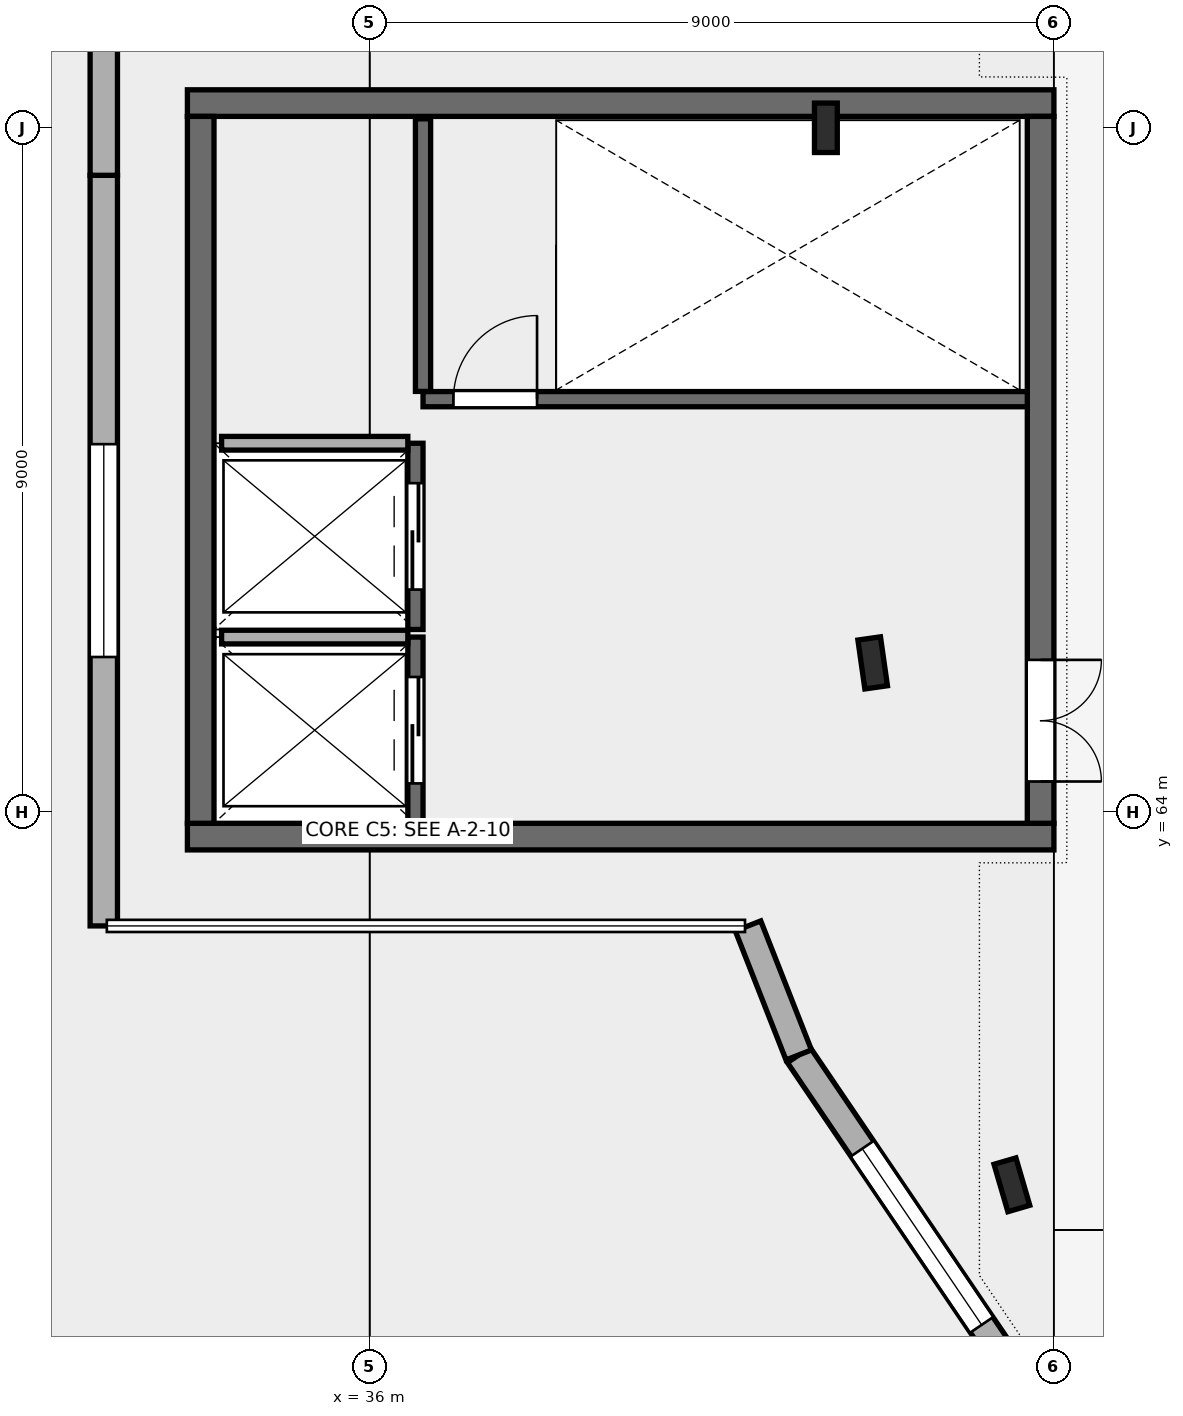
"""IFC4 building model, lengths in metres.
Left out: names, types, materials, properties, quantities, classifications, styles, units other than length and angle.
Written with IfcOpenShell. Run it as: python <this file> out.ifc"""

import sys

from ifc_helpers import new_model, si_unit, direction, frame, frame_2d, origin, origin_2d, place, context, subcontext, project, spatial, rectangle, i_section, extrude, element, fill, save


model = new_model("IFC4")
c1 = context("Model", 3, precision=1e-05, world=origin(), true_north=direction((0.0, 1.0)))
c2 = subcontext(c1, "Body", "Model", "MODEL_VIEW")
j1 = project(units=[si_unit("LENGTHUNIT", "METRE"), si_unit("PLANEANGLEUNIT", "RADIAN")], contexts=[c1])
p1 = place(None, origin())
s1 = spatial("IfcSite", under=j1, at=p1, CompositionType="ELEMENT")
p2 = place(p1, origin())
s2 = spatial("IfcBuilding", under=s1, at=p2, CompositionType="ELEMENT")
p3 = place(p2, frame((0.0, 0.0, 19.5)))
s3 = spatial("IfcBuildingStorey", under=s2, at=p3, CompositionType="ELEMENT", Elevation=19.5)
for number, where, z_axis, x_axis in (
    (1, (42.0, 73.0, 0.0), (0.0, 0.0, 1.0), (-1.0, 0.0, 0.0)),
    (2, (42.615, 65.96, 0.0), (0.0, 0.0, 1.0), (-0.99, -0.141, 0.0)),
    (3, (44.447, 59.094, 0.0), (0.0, 0.0, 1.0), (-0.96, -0.281, 0.0)),
):
    element("IfcColumn", number, at=place(p3, frame(where, z_axis=z_axis, x_axis=x_axis)), inside=s3, PredefinedType="COLUMN", context=c2, shape_type="SweptSolid", body=[
        extrude(i_section(OverallWidth=0.3, OverallDepth=0.65, WebThickness=0.016, FlangeThickness=0.031, FilletRadius=0.027, at=origin_2d()), origin(), (0.0, 0.0, 1.0), 4.5),
    ])
for number, where, z_axis, x_axis in (
    (4, (33.6, 63.675, 0.0), (0.0, 0.0, 1.0), (1.0, 0.0, 0.0)),
    (5, (33.6, 73.325, 0.0), (0.0, 0.0, 1.0), (1.0, 0.0, 0.0)),
):
    element("IfcWall", number, at=place(p3, frame(where, z_axis=z_axis, x_axis=x_axis)), inside=s3, PredefinedType="SHEAR", context=c2, shape_type="SweptSolid", body=[
        extrude(rectangle(XDim=11.4, YDim=0.35, at=frame_2d((5.7, 0.0))), origin(), (0.0, 0.0, 1.0), 4.5),
    ])
p4 = place(p3, frame((33.775, 63.85, 0.0), z_axis=(0.0, 0.0, 1.0), x_axis=(0.0, 1.0, 0.0)))
e6 = element("IfcWall", 6, at=p4, inside=s3, PredefinedType="SHEAR", context=c2, shape_type="SweptSolid", body=[
    extrude(rectangle(XDim=9.3, YDim=0.35, at=frame_2d((4.65, 0.0))), origin(), (0.0, 0.0, 1.0), 4.5),
])
p5 = place(p3, frame((44.825, 63.85, 0.0), z_axis=(0.0, 0.0, 1.0), x_axis=(0.0, 1.0, 0.0)))
e7 = element("IfcWall", 7, at=p5, inside=s3, PredefinedType="SHEAR", context=c2, shape_type="SweptSolid", body=[
    extrude(rectangle(XDim=9.3, YDim=0.35, at=frame_2d((4.65, 0.0))), origin(), (0.0, 0.0, 1.0), 4.5),
])
p6 = place(p5, frame((0.55, 0.0, 0.0)))
e8 = element("IfcOpeningElement", 8, at=p6, cuts=e7, PredefinedType="OPENING", context=c2, shape_type="SweptSolid", body=[
    extrude(rectangle(XDim=1.6, YDim=2.2, at=frame_2d((0.8, 1.1))), frame((0.0, 0.185, 0.0), z_axis=(0.0, -1.0, 0.0), x_axis=(1.0, 0.0, 0.0)), (0.0, 0.0, 1.0), 0.37),
])
p7 = place(p3, frame((44.885, 56.018, 0.0), z_axis=(0.0, 0.0, 1.0), x_axis=(-0.561059216787, 0.82777566723, 0.0)))
e9 = element("IfcWall", 9, at=p7, inside=s3, PredefinedType="STANDARD", context=c2, shape_type="SweptSolid", body=[
    extrude(rectangle(XDim=5.78, YDim=0.36, at=frame_2d((2.89, 0.0))), origin(), (0.0, 0.0, 1.0), 4.25),
])
p8 = place(p7, frame((1.49, 0.0, 0.9)))
e10 = element("IfcOpeningElement", 10, at=p8, cuts=e9, PredefinedType="OPENING", context=c2, shape_type="SweptSolid", body=[
    extrude(rectangle(XDim=2.8, YDim=1.9, at=frame_2d((1.4, 0.95))), frame((0.0, 0.19, 0.0), z_axis=(0.0, -1.0, 0.0), x_axis=(1.0, 0.0, 0.0)), (0.0, 0.0, 1.0), 0.38),
])
p9 = place(p3, frame((41.643, 60.802, 0.0), z_axis=(0.0, 0.0, 1.0), x_axis=(-0.365590245577, 0.930775898022, 0.0)))
e11 = element("IfcWall", 11, at=p9, inside=s3, PredefinedType="STANDARD", context=c2, shape_type="SweptSolid", body=[
    extrude(rectangle(XDim=1.824, YDim=0.36, at=frame_2d((0.912, 0.0))), origin(), (0.0, 0.0, 1.0), 4.25),
])
p10 = place(p3, frame((32.5, 62.5, 0.0), z_axis=(0.0, 0.0, 1.0), x_axis=(0.0, 1.0, 0.0)))
e12 = element("IfcWall", 12, at=p10, inside=s3, PredefinedType="STANDARD", context=c2, shape_type="SweptSolid", body=[
    extrude(rectangle(XDim=9.875, YDim=0.36, at=frame_2d((4.938, 0.0))), origin(), (0.0, 0.0, 1.0), 4.25),
])
p11 = place(p10, frame((3.538, 0.0, 0.9)))
e13 = element("IfcOpeningElement", 13, at=p11, cuts=e12, PredefinedType="OPENING", context=c2, shape_type="SweptSolid", body=[
    extrude(rectangle(XDim=2.8, YDim=1.9, at=frame_2d((1.4, 0.95))), frame((0.0, 0.19, 0.0), z_axis=(0.0, -1.0, 0.0), x_axis=(1.0, 0.0, 0.0)), (0.0, 0.0, 1.0), 0.38),
])
p12 = place(p3, frame((32.5, 72.375, 0.0), z_axis=(0.0, 0.0, 1.0), x_axis=(0.0, 1.0, 0.0)))
e14 = element("IfcWall", 14, at=p12, inside=s3, PredefinedType="STANDARD", context=c2, shape_type="SweptSolid", body=[
    extrude(rectangle(XDim=9.875, YDim=0.36, at=frame_2d((4.938, 0.0))), origin(), (0.0, 0.0, 1.0), 4.25),
])
p13 = place(p12, frame((3.538, 0.0, 0.9)))
e15 = element("IfcOpeningElement", 15, at=p13, cuts=e14, PredefinedType="OPENING", context=c2, shape_type="SweptSolid", body=[
    extrude(rectangle(XDim=2.8, YDim=1.9, at=frame_2d((1.4, 0.95))), frame((0.0, 0.19, 0.0), z_axis=(0.0, -1.0, 0.0), x_axis=(1.0, 0.0, 0.0)), (0.0, 0.0, 1.0), 0.38),
])
p14 = place(p3, frame((36.6, 63.85, 0.0), z_axis=(0.0, 0.0, 1.0), x_axis=(0.0, 1.0, 0.0)))
e16 = element("IfcWall", 16, at=p14, inside=s3, PredefinedType="SHEAR", context=c2, shape_type="SweptSolid", body=[
    extrude(rectangle(XDim=2.45, YDim=0.2, at=frame_2d((1.225, 0.0))), origin(), (0.0, 0.0, 1.0), 4.25),
])
p15 = place(p14, frame((0.525, 0.0, 0.0)))
e17 = element("IfcOpeningElement", 17, at=p15, cuts=e16, PredefinedType="OPENING", context=c2, shape_type="SweptSolid", body=[
    extrude(rectangle(XDim=1.4, YDim=2.2, at=frame_2d((0.7, 1.1))), frame((0.0, 0.11, 0.0), z_axis=(0.0, -1.0, 0.0), x_axis=(1.0, 0.0, 0.0)), (0.0, 0.0, 1.0), 0.22),
])
p16 = place(p3, frame((34.05, 66.3, 0.0), z_axis=(0.0, 0.0, 1.0), x_axis=(1.0, 0.0, 0.0)))
e18 = element("IfcWall", 18, at=p16, inside=s3, PredefinedType="PARTITIONING", context=c2, shape_type="SweptSolid", body=[
    extrude(rectangle(XDim=2.45, YDim=0.18, at=frame_2d((1.225, 0.0))), origin(), (0.0, 0.0, 1.0), 4.5),
])
p17 = place(p3, frame((36.6, 66.4, 0.0), z_axis=(0.0, 0.0, 1.0), x_axis=(0.0, 1.0, 0.0)))
e19 = element("IfcWall", 19, at=p17, inside=s3, PredefinedType="SHEAR", context=c2, shape_type="SweptSolid", body=[
    extrude(rectangle(XDim=2.45, YDim=0.2, at=frame_2d((1.225, 0.0))), origin(), (0.0, 0.0, 1.0), 4.25),
])
p18 = place(p17, frame((0.525, 0.0, 0.0)))
e20 = element("IfcOpeningElement", 20, at=p18, cuts=e19, PredefinedType="OPENING", context=c2, shape_type="SweptSolid", body=[
    extrude(rectangle(XDim=1.4, YDim=2.2, at=frame_2d((0.7, 1.1))), frame((0.0, 0.11, 0.0), z_axis=(0.0, -1.0, 0.0), x_axis=(1.0, 0.0, 0.0)), (0.0, 0.0, 1.0), 0.22),
])
p19 = place(p3, frame((34.05, 68.85, 0.0), z_axis=(0.0, 0.0, 1.0), x_axis=(1.0, 0.0, 0.0)))
e21 = element("IfcWall", 21, at=p19, inside=s3, PredefinedType="PARTITIONING", context=c2, shape_type="SweptSolid", body=[
    extrude(rectangle(XDim=2.45, YDim=0.18, at=frame_2d((1.225, 0.0))), origin(), (0.0, 0.0, 1.0), 4.5),
])
p20 = place(p3, frame((36.7, 69.43, 0.0), z_axis=(0.0, 0.0, 1.0), x_axis=(1.0, 0.0, 0.0)))
e22 = element("IfcWall", 22, at=p20, inside=s3, PredefinedType="SHEAR", context=c2, shape_type="SweptSolid", body=[
    extrude(rectangle(XDim=7.95, YDim=0.2, at=frame_2d((3.975, 0.0))), origin(), (0.0, 0.0, 1.0), 4.5),
])
p21 = place(p20, frame((0.4, 0.0, 0.0)))
e23 = element("IfcOpeningElement", 23, at=p21, cuts=e22, PredefinedType="OPENING", context=c2, shape_type="SweptSolid", body=[
    extrude(rectangle(XDim=1.1, YDim=2.15, at=frame_2d((0.55, 1.075))), frame((0.0, 0.11, 0.0), z_axis=(0.0, -1.0, 0.0), x_axis=(1.0, 0.0, 0.0)), (0.0, 0.0, 1.0), 0.22),
])
p22 = place(p3, frame((36.7, 69.532, 0.0), z_axis=(0.0, 0.0, 1.0), x_axis=(0.0, 1.0, 0.0)))
e24 = element("IfcWall", 24, at=p22, inside=s3, PredefinedType="SHEAR", context=c2, shape_type="SweptSolid", body=[
    extrude(rectangle(XDim=3.586, YDim=0.2, at=frame_2d((1.793, 0.0))), origin(), (0.0, 0.0, 1.0), 4.5),
])
p23 = place(p8, origin())
e25 = element("IfcWindow", 25, at=p23, inside=s3, PartitioningType="SINGLE_PANEL", PredefinedType="WINDOW", context=c2, shape_type="SweptSolid", body=[
    extrude(rectangle(XDim=2.8, YDim=1.9, at=frame_2d((1.4, 0.95))), frame((0.0, 0.03, 0.0), z_axis=(0.0, -1.0, 0.0), x_axis=(1.0, 0.0, 0.0)), (0.0, 0.0, 1.0), 0.06),
])
fill(e10, e25)
p24 = place(p11, origin())
e26 = element("IfcWindow", 26, at=p24, inside=s3, PartitioningType="SINGLE_PANEL", PredefinedType="WINDOW", context=c2, shape_type="SweptSolid", body=[
    extrude(rectangle(XDim=2.8, YDim=1.9, at=frame_2d((1.4, 0.95))), frame((0.0, 0.03, 0.0), z_axis=(0.0, -1.0, 0.0), x_axis=(1.0, 0.0, 0.0)), (0.0, 0.0, 1.0), 0.06),
])
fill(e13, e26)
p25 = place(p15, origin())
e27 = element("IfcDoor", 27, at=p25, inside=s3, OperationType="DOUBLE_DOOR_SLIDING", PredefinedType="DOOR", context=c2, shape_type="SweptSolid", body=[
    extrude(rectangle(XDim=1.4, YDim=2.2, at=frame_2d((0.7, 1.1))), frame((0.0, 0.025, 0.0), z_axis=(0.0, -1.0, 0.0), x_axis=(1.0, 0.0, 0.0)), (0.0, 0.0, 1.0), 0.05),
])
fill(e17, e27)
p26 = place(p18, origin())
e28 = element("IfcDoor", 28, at=p26, inside=s3, OperationType="DOUBLE_DOOR_SLIDING", PredefinedType="DOOR", context=c2, shape_type="SweptSolid", body=[
    extrude(rectangle(XDim=1.4, YDim=2.2, at=frame_2d((0.7, 1.1))), frame((0.0, 0.025, 0.0), z_axis=(0.0, -1.0, 0.0), x_axis=(1.0, 0.0, 0.0)), (0.0, 0.0, 1.0), 0.05),
])
fill(e20, e28)
p27 = place(p21, frame((1.1, 0.0, 0.0), z_axis=(0.0, 0.0, 1.0), x_axis=(-1.0, 0.0, 0.0)))
e29 = element("IfcDoor", 29, at=p27, inside=s3, OperationType="SINGLE_SWING_LEFT", PredefinedType="DOOR", context=c2, shape_type="SweptSolid", body=[
    extrude(rectangle(XDim=1.1, YDim=2.15, at=frame_2d((0.55, 1.075))), frame((0.0, 0.025, 0.0), z_axis=(0.0, -1.0, 0.0), x_axis=(1.0, 0.0, 0.0)), (0.0, 0.0, 1.0), 0.05),
])
fill(e23, e29)
p28 = place(p6, frame((1.6, 0.0, 0.0), z_axis=(0.0, 0.0, 1.0), x_axis=(-1.0, 0.0, 0.0)))
e30 = element("IfcDoor", 30, at=p28, inside=s3, OperationType="DOUBLE_DOOR_SINGLE_SWING", PredefinedType="DOOR", context=c2, shape_type="SweptSolid", body=[
    extrude(rectangle(XDim=1.6, YDim=2.2, at=frame_2d((0.8, 1.1))), frame((0.0, 0.025, 0.0), z_axis=(0.0, -1.0, 0.0), x_axis=(1.0, 0.0, 0.0)), (0.0, 0.0, 1.0), 0.05),
])
fill(e8, e30)
save(model, sys.argv[1])
